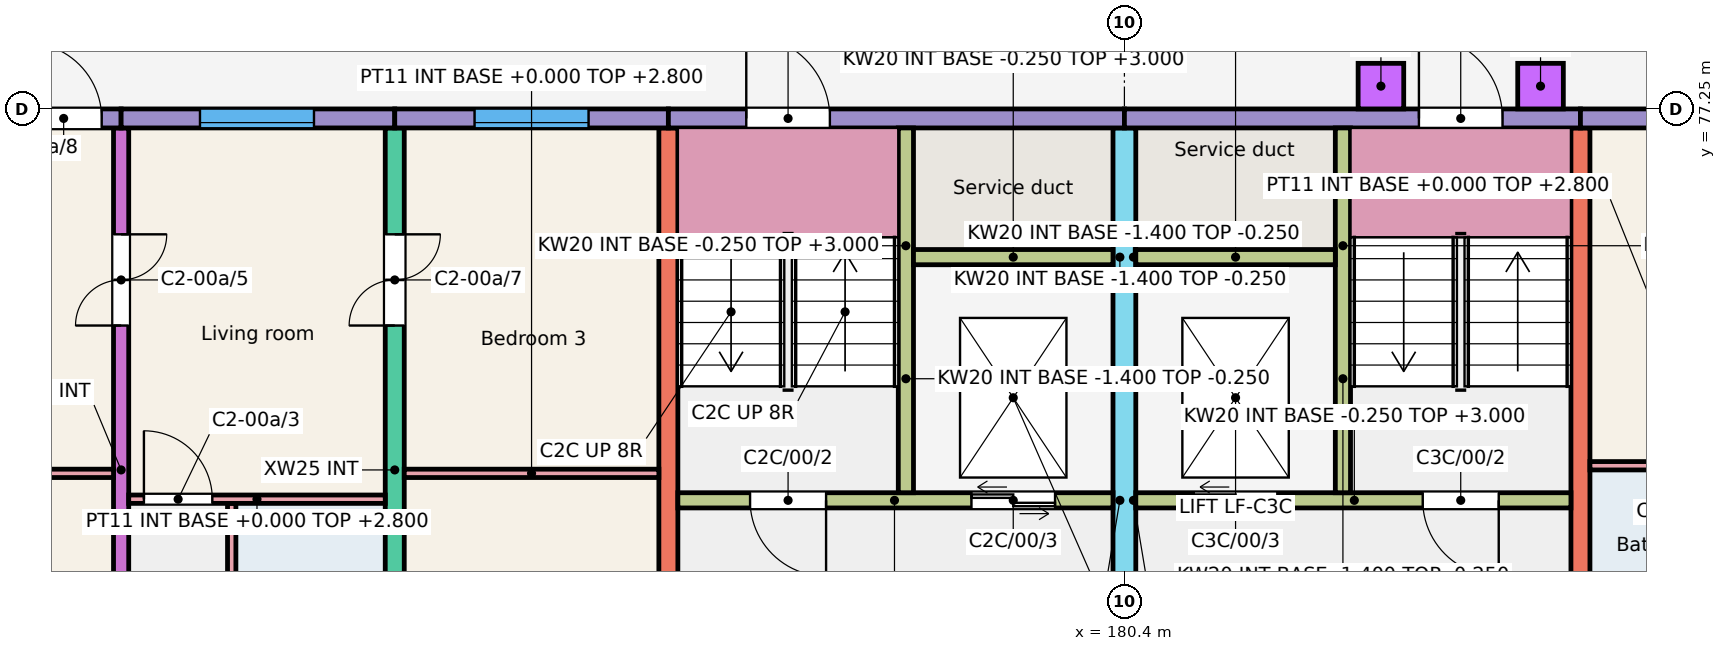
"""IFC4 building model, lengths in metres.
Left out: names, types, materials, properties, quantities, classifications, styles, units other than length and angle.
Written with IfcOpenShell. Run it as: python <this file> out.ifc"""

import sys

from ifc_helpers import new_model, si_unit, direction, frame, frame_2d, origin, origin_2d, place, context, subcontext, project, spatial, rectangle, extrude, element, fill, save


model = new_model("IFC4")
c1 = context("Model", 3, precision=1e-05, world=origin(), true_north=direction((0.0, 1.0)))
c2 = subcontext(c1, "Body", "Model", "MODEL_VIEW")
j1 = project(units=[si_unit("LENGTHUNIT", "METRE"), si_unit("PLANEANGLEUNIT", "RADIAN")], contexts=[c1])
p1 = place(None, origin())
s1 = spatial("IfcSite", under=j1, at=p1, CompositionType="ELEMENT")
p2 = place(p1, origin())
s2 = spatial("IfcBuilding", under=s1, at=p2, CompositionType="ELEMENT")
p3 = place(p2, origin())
s3 = spatial("IfcBuildingStorey", under=s2, at=p3, CompositionType="ELEMENT", Elevation=0.0)
p4 = place(p3, frame((167.2, 68.0, -0.25), z_axis=(0.0, 0.0, 1.0), x_axis=(0.0, 1.0, 0.0)))
e1 = element("IfcWall", 1, at=p4, inside=s3, PredefinedType="SHEAR", context=c2, shape_type="SweptSolid", body=[
    extrude(rectangle(XDim=9.0, YDim=0.2, at=frame_2d((4.5, 0.0))), origin(), (0.0, 0.0, 1.0), 3.25),
])
p5 = place(p4, frame((0.175, 0.0, 0.25)))
e2 = element("IfcOpeningElement", 2, at=p5, cuts=e1, PredefinedType="OPENING", context=c2, shape_type="SweptSolid", body=[
    extrude(rectangle(XDim=1.2, YDim=2.1, at=frame_2d((0.6, 1.05))), frame((0.0, 0.11, 0.0), z_axis=(0.0, -1.0, 0.0), x_axis=(1.0, 0.0, 0.0)), (0.0, 0.0, 1.0), 0.22),
])
p6 = place(p4, frame((6.4, 0.0, 0.25)))
e3 = element("IfcOpeningElement", 3, at=p6, cuts=e1, PredefinedType="OPENING", context=c2, shape_type="SweptSolid", body=[
    extrude(rectangle(XDim=1.2, YDim=2.1, at=frame_2d((0.6, 1.05))), frame((0.0, 0.11, 0.0), z_axis=(0.0, -1.0, 0.0), x_axis=(1.0, 0.0, 0.0)), (0.0, 0.0, 1.0), 0.22),
])
p7 = place(p3, frame((170.8, 68.0, -0.25), z_axis=(0.0, 0.0, 1.0), x_axis=(0.0, 1.0, 0.0)))
e4 = element("IfcWall", 4, at=p7, inside=s3, PredefinedType="SHEAR", context=c2, shape_type="SweptSolid", body=[
    extrude(rectangle(XDim=9.0, YDim=0.25, at=frame_2d((4.5, 0.0))), origin(), (0.0, 0.0, 1.0), 3.25),
])
p8 = place(p7, frame((0.175, 0.0, 0.25)))
e5 = element("IfcOpeningElement", 5, at=p8, cuts=e4, PredefinedType="OPENING", context=c2, shape_type="SweptSolid", body=[
    extrude(rectangle(XDim=1.2, YDim=2.1, at=frame_2d((0.6, 1.05))), frame((0.0, 0.135, 0.0), z_axis=(0.0, -1.0, 0.0), x_axis=(1.0, 0.0, 0.0)), (0.0, 0.0, 1.0), 0.27),
])
p9 = place(p7, frame((6.4, 0.0, 0.25)))
e6 = element("IfcOpeningElement", 6, at=p9, cuts=e4, PredefinedType="OPENING", context=c2, shape_type="SweptSolid", body=[
    extrude(rectangle(XDim=1.2, YDim=2.1, at=frame_2d((0.6, 1.05))), frame((0.0, 0.135, 0.0), z_axis=(0.0, -1.0, 0.0), x_axis=(1.0, 0.0, 0.0)), (0.0, 0.0, 1.0), 0.27),
])
p10 = place(p3, frame((174.4, 68.0, -0.25), z_axis=(0.0, 0.0, 1.0), x_axis=(0.0, 1.0, 0.0)))
e7 = element("IfcWall", 7, at=p10, inside=s3, PredefinedType="SHEAR", context=c2, shape_type="SweptSolid", body=[
    extrude(rectangle(XDim=9.0, YDim=0.25, at=frame_2d((4.5, 0.0))), origin(), (0.0, 0.0, 1.0), 3.25),
])
p11 = place(p3, frame((180.4, 66.0, -0.25), z_axis=(0.0, 0.0, 1.0), x_axis=(0.0, 1.0, 0.0)))
e8 = element("IfcWall", 8, at=p11, inside=s3, PredefinedType="SHEAR", context=c2, shape_type="SweptSolid", body=[
    extrude(rectangle(XDim=11.0, YDim=0.3, at=frame_2d((5.5, 0.0))), origin(), (0.0, 0.0, 1.0), 3.25),
])
p12 = place(p11, frame((0.3, 0.0, 0.25)))
e9 = element("IfcOpeningElement", 9, at=p12, cuts=e8, PredefinedType="OPENING", context=c2, shape_type="SweptSolid", body=[
    extrude(rectangle(XDim=1.2, YDim=2.1, at=frame_2d((0.6, 1.05))), frame((0.0, 0.16, 0.0), z_axis=(0.0, -1.0, 0.0), x_axis=(1.0, 0.0, 0.0)), (0.0, 0.0, 1.0), 0.32),
])
p13 = place(p3, frame((186.4, 68.0, -0.25), z_axis=(0.0, 0.0, 1.0), x_axis=(0.0, 1.0, 0.0)))
e10 = element("IfcWall", 10, at=p13, inside=s3, PredefinedType="SHEAR", context=c2, shape_type="SweptSolid", body=[
    extrude(rectangle(XDim=9.0, YDim=0.25, at=frame_2d((4.5, 0.0))), origin(), (0.0, 0.0, 1.0), 3.25),
])
p14 = place(p3, frame((163.6, 77.125, -0.25), z_axis=(0.0, 0.0, 1.0), x_axis=(1.0, 0.0, 0.0)))
e11 = element("IfcWall", 11, at=p14, inside=s3, PredefinedType="SOLIDWALL", context=c2, shape_type="SweptSolid", body=[
    extrude(rectangle(XDim=3.6, YDim=0.25, at=frame_2d((1.8, 0.0))), origin(), (0.0, 0.0, 1.0), 3.25),
])
p15 = place(p14, frame((0.597, 0.0, 1.35)))
e12 = element("IfcOpeningElement", 12, at=p15, cuts=e11, PredefinedType="OPENING", context=c2, shape_type="SweptSolid", body=[
    extrude(rectangle(XDim=1.2, YDim=1.3, at=frame_2d((0.6, 0.65))), frame((0.0, 0.135, 0.0), z_axis=(0.0, -1.0, 0.0), x_axis=(1.0, 0.0, 0.0)), (0.0, 0.0, 1.0), 0.27),
])
p16 = place(p14, frame((2.344, 0.0, 0.25)))
e13 = element("IfcOpeningElement", 13, at=p16, cuts=e11, PredefinedType="OPENING", context=c2, shape_type="SweptSolid", body=[
    extrude(rectangle(XDim=1.0, YDim=2.1, at=frame_2d((0.5, 1.05))), frame((0.0, 0.135, 0.0), z_axis=(0.0, -1.0, 0.0), x_axis=(1.0, 0.0, 0.0)), (0.0, 0.0, 1.0), 0.27),
])
p17 = place(p3, frame((167.2, 77.125, -0.25), z_axis=(0.0, 0.0, 1.0), x_axis=(1.0, 0.0, 0.0)))
e14 = element("IfcWall", 14, at=p17, inside=s3, PredefinedType="SOLIDWALL", context=c2, shape_type="SweptSolid", body=[
    extrude(rectangle(XDim=3.6, YDim=0.25, at=frame_2d((1.8, 0.0))), origin(), (0.0, 0.0, 1.0), 3.25),
])
p18 = place(p17, frame((1.038, 0.0, 1.15)))
e15 = element("IfcOpeningElement", 15, at=p18, cuts=e14, PredefinedType="OPENING", context=c2, shape_type="SweptSolid", body=[
    extrude(rectangle(XDim=1.5, YDim=1.5, at=frame_2d((0.75, 0.75))), frame((0.0, 0.135, 0.0), z_axis=(0.0, -1.0, 0.0), x_axis=(1.0, 0.0, 0.0)), (0.0, 0.0, 1.0), 0.27),
])
p19 = place(p3, frame((170.8, 77.125, -0.25), z_axis=(0.0, 0.0, 1.0), x_axis=(1.0, 0.0, 0.0)))
e16 = element("IfcWall", 16, at=p19, inside=s3, PredefinedType="SOLIDWALL", context=c2, shape_type="SweptSolid", body=[
    extrude(rectangle(XDim=3.6, YDim=0.25, at=frame_2d((1.8, 0.0))), origin(), (0.0, 0.0, 1.0), 3.25),
])
p20 = place(p19, frame((1.05, 0.0, 1.15)))
e17 = element("IfcOpeningElement", 17, at=p20, cuts=e16, PredefinedType="OPENING", context=c2, shape_type="SweptSolid", body=[
    extrude(rectangle(XDim=1.5, YDim=1.5, at=frame_2d((0.75, 0.75))), frame((0.0, 0.135, 0.0), z_axis=(0.0, -1.0, 0.0), x_axis=(1.0, 0.0, 0.0)), (0.0, 0.0, 1.0), 0.27),
])
p21 = place(p3, frame((174.4, 77.125, -0.25), z_axis=(0.0, 0.0, 1.0), x_axis=(1.0, 0.0, 0.0)))
e18 = element("IfcWall", 18, at=p21, inside=s3, PredefinedType="SOLIDWALL", context=c2, shape_type="SweptSolid", body=[
    extrude(rectangle(XDim=6.0, YDim=0.25, at=frame_2d((3.0, 0.0))), origin(), (0.0, 0.0, 1.0), 3.25),
])
p22 = place(p21, frame((1.025, 0.0, 0.25)))
e19 = element("IfcOpeningElement", 19, at=p22, cuts=e18, PredefinedType="OPENING", context=c2, shape_type="SweptSolid", body=[
    extrude(rectangle(XDim=1.1, YDim=2.1, at=frame_2d((0.55, 1.05))), frame((0.0, 0.135, 0.0), z_axis=(0.0, -1.0, 0.0), x_axis=(1.0, 0.0, 0.0)), (0.0, 0.0, 1.0), 0.27),
])
p23 = place(p3, frame((174.525, 72.1, -0.25), z_axis=(0.0, 0.0, 1.0), x_axis=(1.0, 0.0, 0.0)))
e20 = element("IfcWall", 20, at=p23, inside=s3, PredefinedType="SHEAR", context=c2, shape_type="SweptSolid", body=[
    extrude(rectangle(XDim=5.725, YDim=0.2, at=frame_2d((2.863, 0.0))), origin(), (0.0, 0.0, 1.0), 3.25),
])
p24 = place(p23, frame((0.95, 0.0, 0.25)))
e21 = element("IfcOpeningElement", 21, at=p24, cuts=e20, PredefinedType="OPENING", context=c2, shape_type="SweptSolid", body=[
    extrude(rectangle(XDim=1.0, YDim=2.1, at=frame_2d((0.5, 1.05))), frame((0.0, 0.11, 0.0), z_axis=(0.0, -1.0, 0.0), x_axis=(1.0, 0.0, 0.0)), (0.0, 0.0, 1.0), 0.22),
])
p25 = place(p23, frame((3.863, 0.0, 0.25)))
e22 = element("IfcOpeningElement", 22, at=p25, cuts=e20, PredefinedType="OPENING", context=c2, shape_type="SweptSolid", body=[
    extrude(rectangle(XDim=1.1, YDim=2.1, at=frame_2d((0.55, 1.05))), frame((0.0, 0.11, 0.0), z_axis=(0.0, -1.0, 0.0), x_axis=(1.0, 0.0, 0.0)), (0.0, 0.0, 1.0), 0.22),
])
p26 = place(p3, frame((177.525, 72.2, -0.25), z_axis=(0.0, 0.0, 1.0), x_axis=(0.0, 1.0, 0.0)))
e23 = element("IfcWall", 23, at=p26, inside=s3, PredefinedType="SHEAR", context=c2, shape_type="SweptSolid", body=[
    extrude(rectangle(XDim=4.8, YDim=0.2, at=frame_2d((2.4, 0.0))), origin(), (0.0, 0.0, 1.0), 3.25),
])
p27 = place(p3, frame((177.625, 75.3, -0.25), z_axis=(0.0, 0.0, 1.0), x_axis=(1.0, 0.0, 0.0)))
e24 = element("IfcWall", 24, at=p27, inside=s3, PredefinedType="SHEAR", context=c2, shape_type="SweptSolid", body=[
    extrude(rectangle(XDim=2.625, YDim=0.2, at=frame_2d((1.312, 0.0))), origin(), (0.0, 0.0, 1.0), 3.25),
])
p28 = place(p3, frame((180.4, 77.125, -0.25), z_axis=(0.0, 0.0, 1.0), x_axis=(1.0, 0.0, 0.0)))
e25 = element("IfcWall", 25, at=p28, inside=s3, PredefinedType="SOLIDWALL", context=c2, shape_type="SweptSolid", body=[
    extrude(rectangle(XDim=6.0, YDim=0.25, at=frame_2d((3.0, 0.0))), origin(), (0.0, 0.0, 1.0), 3.25),
])
p29 = place(p28, frame((3.875, 0.0, 0.25)))
e26 = element("IfcOpeningElement", 26, at=p29, cuts=e25, PredefinedType="OPENING", context=c2, shape_type="SweptSolid", body=[
    extrude(rectangle(XDim=1.1, YDim=2.1, at=frame_2d((0.55, 1.05))), frame((0.0, 0.135, 0.0), z_axis=(0.0, -1.0, 0.0), x_axis=(1.0, 0.0, 0.0)), (0.0, 0.0, 1.0), 0.27),
])
p30 = place(p3, frame((180.55, 72.1, -0.25), z_axis=(0.0, 0.0, 1.0), x_axis=(1.0, 0.0, 0.0)))
e27 = element("IfcWall", 27, at=p30, inside=s3, PredefinedType="SHEAR", context=c2, shape_type="SweptSolid", body=[
    extrude(rectangle(XDim=5.725, YDim=0.2, at=frame_2d((2.862, 0.0))), origin(), (0.0, 0.0, 1.0), 3.25),
])
p31 = place(p30, frame((3.775, 0.0, 0.25)))
e28 = element("IfcOpeningElement", 28, at=p31, cuts=e27, PredefinedType="OPENING", context=c2, shape_type="SweptSolid", body=[
    extrude(rectangle(XDim=1.0, YDim=2.1, at=frame_2d((0.5, 1.05))), frame((0.0, 0.11, 0.0), z_axis=(0.0, -1.0, 0.0), x_axis=(1.0, 0.0, 0.0)), (0.0, 0.0, 1.0), 0.22),
])
p32 = place(p30, frame((0.762, 0.0, 0.25)))
e29 = element("IfcOpeningElement", 29, at=p32, cuts=e27, PredefinedType="OPENING", context=c2, shape_type="SweptSolid", body=[
    extrude(rectangle(XDim=1.1, YDim=2.1, at=frame_2d((0.55, 1.05))), frame((0.0, 0.11, 0.0), z_axis=(0.0, -1.0, 0.0), x_axis=(1.0, 0.0, 0.0)), (0.0, 0.0, 1.0), 0.22),
])
p33 = place(p3, frame((183.275, 72.2, -0.25), z_axis=(0.0, 0.0, 1.0), x_axis=(0.0, 1.0, 0.0)))
e30 = element("IfcWall", 30, at=p33, inside=s3, PredefinedType="SHEAR", context=c2, shape_type="SweptSolid", body=[
    extrude(rectangle(XDim=4.8, YDim=0.2, at=frame_2d((2.4, 0.0))), origin(), (0.0, 0.0, 1.0), 3.25),
])
p34 = place(p3, frame((180.55, 75.3, -0.25), z_axis=(0.0, 0.0, 1.0), x_axis=(1.0, 0.0, 0.0)))
e31 = element("IfcWall", 31, at=p34, inside=s3, PredefinedType="SHEAR", context=c2, shape_type="SweptSolid", body=[
    extrude(rectangle(XDim=2.625, YDim=0.2, at=frame_2d((1.312, 0.0))), origin(), (0.0, 0.0, 1.0), 3.25),
])
p35 = place(p3, frame((186.4, 77.125, -0.25), z_axis=(0.0, 0.0, 1.0), x_axis=(1.0, 0.0, 0.0)))
e32 = element("IfcWall", 32, at=p35, inside=s3, PredefinedType="SOLIDWALL", context=c2, shape_type="SweptSolid", body=[
    extrude(rectangle(XDim=3.6, YDim=0.25, at=frame_2d((1.8, 0.0))), origin(), (0.0, 0.0, 1.0), 3.25),
])
p36 = place(p35, frame((1.05, 0.0, 1.15)))
e33 = element("IfcOpeningElement", 33, at=p36, cuts=e32, PredefinedType="OPENING", context=c2, shape_type="SweptSolid", body=[
    extrude(rectangle(XDim=1.5, YDim=1.5, at=frame_2d((0.75, 0.75))), frame((0.0, 0.135, 0.0), z_axis=(0.0, -1.0, 0.0), x_axis=(1.0, 0.0, 0.0)), (0.0, 0.0, 1.0), 0.27),
])
for number, where, z_axis, x_axis in (
    (34, (177.425, 72.1, -1.4), (0.0, 0.0, 1.0), (1.0, 0.0, 0.0)),
    (35, (177.425, 75.3, -1.4), (0.0, 0.0, 1.0), (1.0, 0.0, 0.0)),
):
    element("IfcWall", number, at=place(p3, frame(where, z_axis=z_axis, x_axis=x_axis)), inside=s3, PredefinedType="SHEAR", context=c2, shape_type="SweptSolid", body=[
        extrude(rectangle(XDim=2.975, YDim=0.2, at=frame_2d((1.487, 0.0))), origin(), (0.0, 0.0, 1.0), 1.15),
    ])
p37 = place(p3, frame((177.525, 72.2, -1.4), z_axis=(0.0, 0.0, 1.0), x_axis=(0.0, 1.0, 0.0)))
e36 = element("IfcWall", 36, at=p37, inside=s3, PredefinedType="SHEAR", context=c2, shape_type="SweptSolid", body=[
    extrude(rectangle(XDim=3.0, YDim=0.2, at=frame_2d((1.5, 0.0))), origin(), (0.0, 0.0, 1.0), 1.15),
])
p38 = place(p3, frame((180.325, 72.2, -1.4), z_axis=(0.0, 0.0, 1.0), x_axis=(0.0, 1.0, 0.0)))
e37 = element("IfcWall", 37, at=p38, inside=s3, PredefinedType="SHEAR", context=c2, shape_type="SweptSolid", body=[
    extrude(rectangle(XDim=3.0, YDim=0.15, at=frame_2d((1.5, 0.0))), origin(), (0.0, 0.0, 1.0), 1.15),
])
for number, where, z_axis, x_axis in (
    (38, (180.4, 72.1, -1.4), (0.0, 0.0, 1.0), (1.0, 0.0, 0.0)),
    (39, (180.4, 75.3, -1.4), (0.0, 0.0, 1.0), (1.0, 0.0, 0.0)),
):
    element("IfcWall", number, at=place(p3, frame(where, z_axis=z_axis, x_axis=x_axis)), inside=s3, PredefinedType="SHEAR", context=c2, shape_type="SweptSolid", body=[
        extrude(rectangle(XDim=2.975, YDim=0.2, at=frame_2d((1.488, 0.0))), origin(), (0.0, 0.0, 1.0), 1.15),
    ])
p39 = place(p3, frame((183.275, 72.2, -1.4), z_axis=(0.0, 0.0, 1.0), x_axis=(0.0, 1.0, 0.0)))
e40 = element("IfcWall", 40, at=p39, inside=s3, PredefinedType="SHEAR", context=c2, shape_type="SweptSolid", body=[
    extrude(rectangle(XDim=3.0, YDim=0.2, at=frame_2d((1.5, 0.0))), origin(), (0.0, 0.0, 1.0), 1.15),
])
p40 = place(p3, frame((180.475, 72.2, -1.4), z_axis=(0.0, 0.0, 1.0), x_axis=(0.0, 1.0, 0.0)))
e41 = element("IfcWall", 41, at=p40, inside=s3, PredefinedType="SHEAR", context=c2, shape_type="SweptSolid", body=[
    extrude(rectangle(XDim=3.0, YDim=0.15, at=frame_2d((1.5, 0.0))), origin(), (0.0, 0.0, 1.0), 1.15),
])
for number, where, z_axis, x_axis in (
    (42, (183.775, 77.55, -0.25), (0.0, 0.0, 1.0), (1.0, 0.0, 0.0)),
    (43, (185.875, 77.55, -0.25), (0.0, 0.0, 1.0), (1.0, 0.0, 0.0)),
):
    element("IfcColumn", number, at=place(p3, frame(where, z_axis=z_axis, x_axis=x_axis)), inside=s3, PredefinedType="COLUMN", context=c2, shape_type="SweptSolid", body=[
        extrude(rectangle(XDim=0.6, YDim=0.6, at=origin_2d()), origin(), (0.0, 0.0, 1.0), 3.15),
    ])
p41 = place(p3, frame((168.655, 69.66, 0.0), z_axis=(0.0, 0.0, 1.0), x_axis=(0.0, 1.0, 0.0)))
e44 = element("IfcWall", 44, at=p41, inside=s3, PredefinedType="PARTITIONING", context=c2, shape_type="SweptSolid", body=[
    extrude(rectangle(XDim=2.4, YDim=0.11, at=frame_2d((1.2, 0.0))), origin(), (0.0, 0.0, 1.0), 2.8),
])
p42 = place(p3, frame((167.3, 72.115, 0.0), z_axis=(0.0, 0.0, 1.0), x_axis=(1.0, 0.0, 0.0)))
e45 = element("IfcWall", 45, at=p42, inside=s3, PredefinedType="PARTITIONING", context=c2, shape_type="SweptSolid", body=[
    extrude(rectangle(XDim=3.375, YDim=0.11, at=frame_2d((1.688, 0.0))), origin(), (0.0, 0.0, 1.0), 2.8),
])
p43 = place(p42, frame((0.2, 0.0, 0.0)))
e46 = element("IfcOpeningElement", 46, at=p43, cuts=e45, PredefinedType="OPENING", context=c2, shape_type="SweptSolid", body=[
    extrude(rectangle(XDim=0.9, YDim=2.1, at=frame_2d((0.45, 1.05))), frame((0.0, 0.065, 0.0), z_axis=(0.0, -1.0, 0.0), x_axis=(1.0, 0.0, 0.0)), (0.0, 0.0, 1.0), 0.13),
])
p44 = place(p3, frame((163.75, 72.455, 0.0), z_axis=(0.0, 0.0, 1.0), x_axis=(1.0, 0.0, 0.0)))
e47 = element("IfcWall", 47, at=p44, inside=s3, PredefinedType="PARTITIONING", context=c2, shape_type="SweptSolid", body=[
    extrude(rectangle(XDim=3.35, YDim=0.11, at=frame_2d((1.675, 0.0))), origin(), (0.0, 0.0, 1.0), 2.8),
])
p45 = place(p3, frame((170.925, 72.455, 0.0), z_axis=(0.0, 0.0, 1.0), x_axis=(1.0, 0.0, 0.0)))
e48 = element("IfcWall", 48, at=p45, inside=s3, PredefinedType="PARTITIONING", context=c2, shape_type="SweptSolid", body=[
    extrude(rectangle(XDim=3.35, YDim=0.11, at=frame_2d((1.675, 0.0))), origin(), (0.0, 0.0, 1.0), 2.8),
])
p46 = place(p3, frame((186.525, 72.555, 0.0), z_axis=(0.0, 0.0, 1.0), x_axis=(1.0, 0.0, 0.0)))
e49 = element("IfcWall", 49, at=p46, inside=s3, PredefinedType="PARTITIONING", context=c2, shape_type="SweptSolid", body=[
    extrude(rectangle(XDim=3.35, YDim=0.11, at=frame_2d((1.675, 0.0))), origin(), (0.0, 0.0, 1.0), 2.8),
])
p47 = place(p46, frame((2.25, 0.0, 0.0)))
e50 = element("IfcOpeningElement", 50, at=p47, cuts=e49, PredefinedType="OPENING", context=c2, shape_type="SweptSolid", body=[
    extrude(rectangle(XDim=0.9, YDim=2.1, at=frame_2d((0.45, 1.05))), frame((0.0, 0.065, 0.0), z_axis=(0.0, -1.0, 0.0), x_axis=(1.0, 0.0, 0.0)), (0.0, 0.0, 1.0), 0.13),
])
p48 = place(p20, origin())
e51 = element("IfcWindow", 51, at=p48, inside=s3, PartitioningType="SINGLE_PANEL", PredefinedType="WINDOW", context=c2, shape_type="SweptSolid", body=[
    extrude(rectangle(XDim=1.5, YDim=1.5, at=frame_2d((0.75, 0.75))), frame((0.0, -0.025, 0.0), z_axis=(0.0, -1.0, 0.0), x_axis=(1.0, 0.0, 0.0)), (0.0, 0.0, 1.0), 0.06),
])
fill(e17, e51)
p49 = place(p18, origin())
e52 = element("IfcWindow", 52, at=p49, inside=s3, PartitioningType="SINGLE_PANEL", PredefinedType="WINDOW", context=c2, shape_type="SweptSolid", body=[
    extrude(rectangle(XDim=1.5, YDim=1.5, at=frame_2d((0.75, 0.75))), frame((0.0, -0.025, 0.0), z_axis=(0.0, -1.0, 0.0), x_axis=(1.0, 0.0, 0.0)), (0.0, 0.0, 1.0), 0.06),
])
fill(e15, e52)
p50 = place(p43, origin())
e53 = element("IfcDoor", 53, at=p50, inside=s3, OperationType="SINGLE_SWING_LEFT", PredefinedType="DOOR", context=c2, shape_type="SweptSolid", body=[
    extrude(rectangle(XDim=0.9, YDim=2.1, at=frame_2d((0.45, 1.05))), frame((0.0, 0.025, 0.0), z_axis=(0.0, -1.0, 0.0), x_axis=(1.0, 0.0, 0.0)), (0.0, 0.0, 1.0), 0.05),
])
fill(e46, e53)
p51 = place(p6, origin())
e54 = element("IfcDoor", 54, at=p51, inside=s3, OperationType="DOUBLE_DOOR_SINGLE_SWING", PredefinedType="DOOR", context=c2, shape_type="SweptSolid", body=[
    extrude(rectangle(XDim=1.2, YDim=2.1, at=frame_2d((0.6, 1.05))), frame((0.0, 0.025, 0.0), z_axis=(0.0, -1.0, 0.0), x_axis=(1.0, 0.0, 0.0)), (0.0, 0.0, 1.0), 0.05),
])
fill(e3, e54)
p52 = place(p9, origin())
e55 = element("IfcDoor", 55, at=p52, inside=s3, OperationType="DOUBLE_DOOR_SINGLE_SWING", PredefinedType="DOOR", context=c2, shape_type="SweptSolid", body=[
    extrude(rectangle(XDim=1.2, YDim=2.1, at=frame_2d((0.6, 1.05))), frame((0.0, 0.025, 0.0), z_axis=(0.0, -1.0, 0.0), x_axis=(1.0, 0.0, 0.0)), (0.0, 0.0, 1.0), 0.05),
])
fill(e6, e55)
p53 = place(p16, origin())
e56 = element("IfcDoor", 56, at=p53, inside=s3, OperationType="SINGLE_SWING_LEFT", PredefinedType="DOOR", context=c2, shape_type="SweptSolid", body=[
    extrude(rectangle(XDim=1.0, YDim=2.1, at=frame_2d((0.5, 1.05))), frame((0.0, 0.025, 0.0), z_axis=(0.0, -1.0, 0.0), x_axis=(1.0, 0.0, 0.0)), (0.0, 0.0, 1.0), 0.05),
])
fill(e13, e56)
p54 = place(p24, origin())
e57 = element("IfcDoor", 57, at=p54, inside=s3, OperationType="SINGLE_SWING_RIGHT", PredefinedType="DOOR", context=c2, shape_type="SweptSolid", body=[
    extrude(rectangle(XDim=1.0, YDim=2.1, at=frame_2d((0.5, 1.05))), frame((0.0, 0.025, 0.0), z_axis=(0.0, -1.0, 0.0), x_axis=(1.0, 0.0, 0.0)), (0.0, 0.0, 1.0), 0.05),
])
fill(e21, e57)
p55 = place(p25, origin())
e58 = element("IfcDoor", 58, at=p55, inside=s3, OperationType="DOUBLE_DOOR_SLIDING", PredefinedType="DOOR", context=c2, shape_type="SweptSolid", body=[
    extrude(rectangle(XDim=1.1, YDim=2.1, at=frame_2d((0.55, 1.05))), frame((0.0, 0.025, 0.0), z_axis=(0.0, -1.0, 0.0), x_axis=(1.0, 0.0, 0.0)), (0.0, 0.0, 1.0), 0.05),
])
fill(e22, e58)
p56 = place(p22, origin())
e59 = element("IfcDoor", 59, at=p56, inside=s3, OperationType="SINGLE_SWING_LEFT", PredefinedType="DOOR", context=c2, shape_type="SweptSolid", body=[
    extrude(rectangle(XDim=1.1, YDim=2.1, at=frame_2d((0.55, 1.05))), frame((0.0, 0.025, 0.0), z_axis=(0.0, -1.0, 0.0), x_axis=(1.0, 0.0, 0.0)), (0.0, 0.0, 1.0), 0.05),
])
fill(e19, e59)
p57 = place(p31, origin())
e60 = element("IfcDoor", 60, at=p57, inside=s3, OperationType="SINGLE_SWING_RIGHT", PredefinedType="DOOR", context=c2, shape_type="SweptSolid", body=[
    extrude(rectangle(XDim=1.0, YDim=2.1, at=frame_2d((0.5, 1.05))), frame((0.0, 0.025, 0.0), z_axis=(0.0, -1.0, 0.0), x_axis=(1.0, 0.0, 0.0)), (0.0, 0.0, 1.0), 0.05),
])
fill(e28, e60)
p58 = place(p32, origin())
e61 = element("IfcDoor", 61, at=p58, inside=s3, OperationType="DOUBLE_DOOR_SLIDING", PredefinedType="DOOR", context=c2, shape_type="SweptSolid", body=[
    extrude(rectangle(XDim=1.1, YDim=2.1, at=frame_2d((0.55, 1.05))), frame((0.0, 0.025, 0.0), z_axis=(0.0, -1.0, 0.0), x_axis=(1.0, 0.0, 0.0)), (0.0, 0.0, 1.0), 0.05),
])
fill(e29, e61)
p59 = place(p29, origin())
e62 = element("IfcDoor", 62, at=p59, inside=s3, OperationType="SINGLE_SWING_LEFT", PredefinedType="DOOR", context=c2, shape_type="SweptSolid", body=[
    extrude(rectangle(XDim=1.1, YDim=2.1, at=frame_2d((0.55, 1.05))), frame((0.0, 0.025, 0.0), z_axis=(0.0, -1.0, 0.0), x_axis=(1.0, 0.0, 0.0)), (0.0, 0.0, 1.0), 0.05),
])
fill(e26, e62)
save(model, sys.argv[1])
